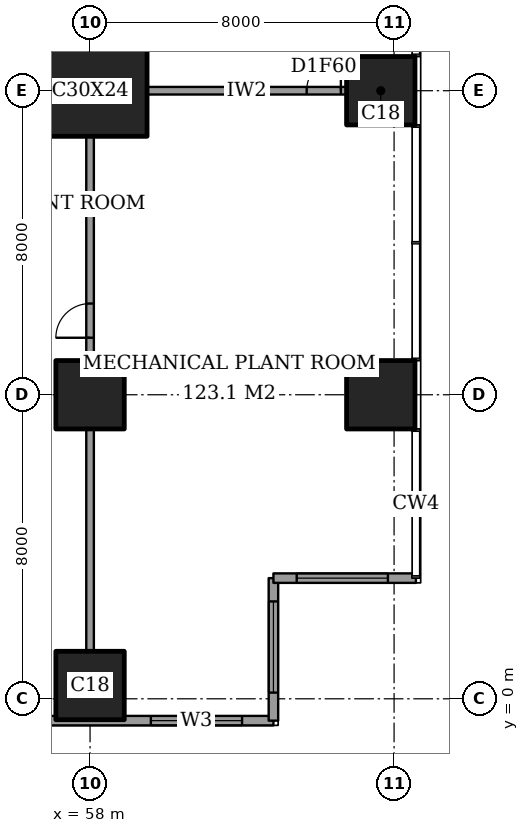
"""IFC4 building model, lengths in metres.
Left out: names, types, materials, properties, quantities, classifications, styles, units other than length and angle.
Written with IfcOpenShell. Run it as: python <this file> out.ifc"""

import sys

from ifc_helpers import new_model, si_unit, direction, frame, frame_2d, origin, origin_2d, place, context, subcontext, project, spatial, rectangle, extrude, element, fill, save


model = new_model("IFC4")
c1 = context("Model", 3, precision=1e-05, world=origin(), true_north=direction((0.0, 1.0)))
c2 = subcontext(c1, "Body", "Model", "MODEL_VIEW")
j1 = project(units=[si_unit("LENGTHUNIT", "METRE"), si_unit("PLANEANGLEUNIT", "RADIAN")], contexts=[c1])
p1 = place(None, origin())
s1 = spatial("IfcSite", under=j1, at=p1, CompositionType="ELEMENT")
p2 = place(p1, origin())
s2 = spatial("IfcBuilding", under=s1, at=p2, CompositionType="ELEMENT")
p3 = place(p2, frame((0.0, 0.0, 177.2)))
s3 = spatial("IfcBuildingStorey", under=s2, at=p3, CompositionType="ELEMENT", Elevation=177.2)
for number, where, z_axis, x_axis in (
    (1, (58.0, 0.35, 0.0), (0.0, 0.0, 1.0), (1.0, 0.0, 0.0)),
    (2, (58.0, 8.0, 0.0), (0.0, 0.0, 1.0), (1.0, 0.0, 0.0)),
):
    element("IfcColumn", number, at=place(p3, frame(where, z_axis=z_axis, x_axis=x_axis)), inside=s3, PredefinedType="COLUMN", context=c2, shape_type="SweptSolid", body=[
        extrude(rectangle(XDim=1.8, YDim=1.8, at=origin_2d()), origin(), (0.0, 0.0, 1.0), 5.0),
    ])
p4 = place(p3, frame((58.0, 16.0, 0.0), z_axis=(0.0, 0.0, 1.0), x_axis=(1.0, 0.0, 0.0)))
e3 = element("IfcColumn", 3, at=p4, inside=s3, PredefinedType="COLUMN", context=c2, shape_type="SweptSolid", body=[
    extrude(rectangle(XDim=3.0, YDim=2.4, at=origin_2d()), origin(), (0.0, 0.0, 1.0), 5.0),
])
for number, where, z_axis, x_axis in (
    (4, (65.65, 8.0, 0.0), (0.0, 0.0, 1.0), (1.0, 0.0, 0.0)),
    (5, (65.65, 16.0, 0.0), (0.0, 0.0, 1.0), (1.0, 0.0, 0.0)),
):
    element("IfcColumn", number, at=place(p3, frame(where, z_axis=z_axis, x_axis=x_axis)), inside=s3, PredefinedType="COLUMN", context=c2, shape_type="SweptSolid", body=[
        extrude(rectangle(XDim=1.8, YDim=1.8, at=origin_2d()), origin(), (0.0, 0.0, 1.0), 5.0),
    ])
p5 = place(p3, frame((41.425, -0.575, 0.0), z_axis=(0.0, 0.0, 1.0), x_axis=(1.0, 0.0, 0.0)))
e6 = element("IfcWall", 6, at=p5, inside=s3, PredefinedType="SOLIDWALL", context=c2, shape_type="SweptSolid", body=[
    extrude(rectangle(XDim=21.4, YDim=0.25, at=frame_2d((10.7, 0.0))), origin(), (0.0, 0.0, 1.0), 5.0),
])
p6 = place(p5, frame((18.175, 0.0, 0.6)))
e7 = element("IfcOpeningElement", 7, at=p6, cuts=e6, PredefinedType="OPENING", context=c2, shape_type="SweptSolid", body=[
    extrude(rectangle(XDim=2.4, YDim=3.0, at=frame_2d((1.2, 1.5))), frame((0.0, 0.135, 0.0), z_axis=(0.0, -1.0, 0.0), x_axis=(1.0, 0.0, 0.0)), (0.0, 0.0, 1.0), 0.27),
])
p7 = place(p3, frame((62.825, -0.575, 0.0), z_axis=(0.0, 0.0, 1.0), x_axis=(0.0, 1.0, 0.0)))
e8 = element("IfcWall", 8, at=p7, inside=s3, PredefinedType="SOLIDWALL", context=c2, shape_type="SweptSolid", body=[
    extrude(rectangle(XDim=3.75, YDim=0.25, at=frame_2d((1.875, 0.0))), origin(), (0.0, 0.0, 1.0), 5.0),
])
p8 = place(p7, frame((0.738, 0.0, 0.6)))
e9 = element("IfcOpeningElement", 9, at=p8, cuts=e8, PredefinedType="OPENING", context=c2, shape_type="SweptSolid", body=[
    extrude(rectangle(XDim=2.4, YDim=3.0, at=frame_2d((1.2, 1.5))), frame((0.0, 0.135, 0.0), z_axis=(0.0, -1.0, 0.0), x_axis=(1.0, 0.0, 0.0)), (0.0, 0.0, 1.0), 0.27),
])
p9 = place(p3, frame((62.825, 3.175, 0.0), z_axis=(0.0, 0.0, 1.0), x_axis=(1.0, 0.0, 0.0)))
e10 = element("IfcWall", 10, at=p9, inside=s3, PredefinedType="SOLIDWALL", context=c2, shape_type="SweptSolid", body=[
    extrude(rectangle(XDim=3.75, YDim=0.25, at=frame_2d((1.875, 0.0))), origin(), (0.0, 0.0, 1.0), 5.0),
])
p10 = place(p9, frame((0.613, 0.0, 0.6)))
e11 = element("IfcOpeningElement", 11, at=p10, cuts=e10, PredefinedType="OPENING", context=c2, shape_type="SweptSolid", body=[
    extrude(rectangle(XDim=2.4, YDim=3.0, at=frame_2d((1.2, 1.5))), frame((0.0, 0.135, 0.0), z_axis=(0.0, -1.0, 0.0), x_axis=(1.0, 0.0, 0.0)), (0.0, 0.0, 1.0), 0.27),
])
p11 = place(p3, frame((59.5, 16.0, 0.0), z_axis=(0.0, 0.0, 1.0), x_axis=(1.0, 0.0, 0.0)))
e12 = element("IfcWall", 12, at=p11, inside=s3, PredefinedType="PARTITIONING", context=c2, shape_type="SweptSolid", body=[
    extrude(rectangle(XDim=5.25, YDim=0.2, at=frame_2d((2.625, 0.0))), origin(), (0.0, 0.0, 1.0), 4.75),
])
p12 = place(p11, frame((4.2, 0.0, 0.0)))
e13 = element("IfcOpeningElement", 13, at=p12, cuts=e12, PredefinedType="OPENING", context=c2, shape_type="SweptSolid", body=[
    extrude(rectangle(XDim=0.9, YDim=2.1, at=frame_2d((0.45, 1.05))), frame((0.0, 0.11, 0.0), z_axis=(0.0, -1.0, 0.0), x_axis=(1.0, 0.0, 0.0)), (0.0, 0.0, 1.0), 0.22),
])
p13 = place(p3, frame((58.0, 1.25, 0.0), z_axis=(0.0, 0.0, 1.0), x_axis=(0.0, 1.0, 0.0)))
e14 = element("IfcWall", 14, at=p13, inside=s3, PredefinedType="PARTITIONING", context=c2, shape_type="SweptSolid", body=[
    extrude(rectangle(XDim=5.85, YDim=0.2, at=frame_2d((2.925, 0.0))), origin(), (0.0, 0.0, 1.0), 4.75),
])
p14 = place(p3, frame((58.0, 8.9, 0.0), z_axis=(0.0, 0.0, 1.0), x_axis=(0.0, 1.0, 0.0)))
e15 = element("IfcWall", 15, at=p14, inside=s3, PredefinedType="PARTITIONING", context=c2, shape_type="SweptSolid", body=[
    extrude(rectangle(XDim=5.9, YDim=0.2, at=frame_2d((2.95, 0.0))), origin(), (0.0, 0.0, 1.0), 4.75),
])
p15 = place(p14, frame((0.6, 0.0, 0.0)))
e16 = element("IfcOpeningElement", 16, at=p15, cuts=e15, PredefinedType="OPENING", context=c2, shape_type="SweptSolid", body=[
    extrude(rectangle(XDim=0.9, YDim=2.1, at=frame_2d((0.45, 1.05))), frame((0.0, 0.11, 0.0), z_axis=(0.0, -1.0, 0.0), x_axis=(1.0, 0.0, 0.0)), (0.0, 0.0, 1.0), 0.22),
])
p16 = place(p6, origin())
e17 = element("IfcWindow", 17, at=p16, inside=s3, PartitioningType="SINGLE_PANEL", PredefinedType="WINDOW", context=c2, shape_type="SweptSolid", body=[
    extrude(rectangle(XDim=2.4, YDim=3.0, at=frame_2d((1.2, 1.5))), frame((0.0, 0.03, 0.0), z_axis=(0.0, -1.0, 0.0), x_axis=(1.0, 0.0, 0.0)), (0.0, 0.0, 1.0), 0.06),
])
fill(e7, e17)
p17 = place(p8, origin())
e18 = element("IfcWindow", 18, at=p17, inside=s3, PartitioningType="SINGLE_PANEL", PredefinedType="WINDOW", context=c2, shape_type="SweptSolid", body=[
    extrude(rectangle(XDim=2.4, YDim=3.0, at=frame_2d((1.2, 1.5))), frame((0.0, 0.03, 0.0), z_axis=(0.0, -1.0, 0.0), x_axis=(1.0, 0.0, 0.0)), (0.0, 0.0, 1.0), 0.06),
])
fill(e9, e18)
p18 = place(p10, origin())
e19 = element("IfcWindow", 19, at=p18, inside=s3, PartitioningType="SINGLE_PANEL", PredefinedType="WINDOW", context=c2, shape_type="SweptSolid", body=[
    extrude(rectangle(XDim=2.4, YDim=3.0, at=frame_2d((1.2, 1.5))), frame((0.0, 0.03, 0.0), z_axis=(0.0, -1.0, 0.0), x_axis=(1.0, 0.0, 0.0)), (0.0, 0.0, 1.0), 0.06),
])
fill(e11, e19)
p19 = place(p12, origin())
e20 = element("IfcDoor", 20, at=p19, inside=s3, OperationType="SINGLE_SWING_LEFT", PredefinedType="DOOR", context=c2, shape_type="SweptSolid", body=[
    extrude(rectangle(XDim=0.9, YDim=2.1, at=frame_2d((0.45, 1.05))), frame((0.0, 0.025, 0.0), z_axis=(0.0, -1.0, 0.0), x_axis=(1.0, 0.0, 0.0)), (0.0, 0.0, 1.0), 0.05),
])
fill(e13, e20)
p20 = place(p15, origin())
e21 = element("IfcDoor", 21, at=p20, inside=s3, OperationType="SINGLE_SWING_RIGHT", PredefinedType="DOOR", context=c2, shape_type="SweptSolid", body=[
    extrude(rectangle(XDim=0.9, YDim=2.1, at=frame_2d((0.45, 1.05))), frame((0.0, 0.025, 0.0), z_axis=(0.0, -1.0, 0.0), x_axis=(1.0, 0.0, 0.0)), (0.0, 0.0, 1.0), 0.05),
])
fill(e16, e21)
save(model, sys.argv[1])
